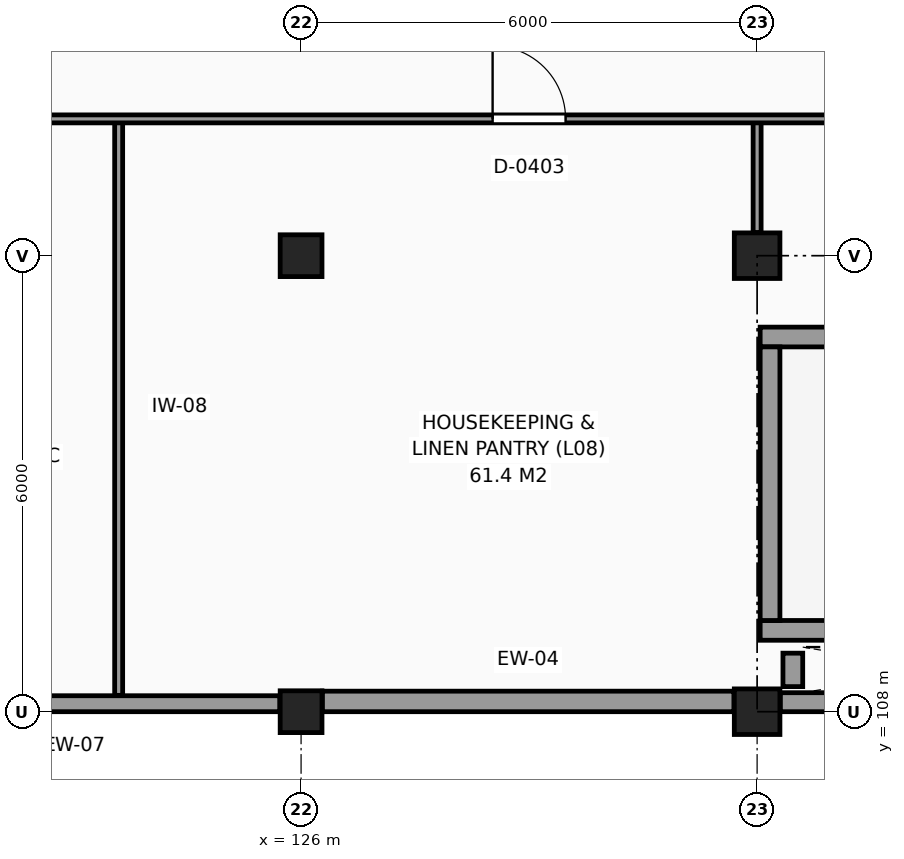
"""IFC4 building model, lengths in metres.
Left out: names, types, materials, properties, quantities, classifications, styles, units other than length and angle.
Written with IfcOpenShell. Run it as: python <this file> out.ifc"""

import sys

from ifc_helpers import new_model, si_unit, direction, frame, frame_2d, origin, origin_2d, place, context, subcontext, project, spatial, rectangle, extrude, element, fill, save


model = new_model("IFC4")
c1 = context("Model", 3, precision=1e-05, world=origin(), true_north=direction((0.0, 1.0)))
c2 = subcontext(c1, "Body", "Model", "MODEL_VIEW")
j1 = project(units=[si_unit("LENGTHUNIT", "METRE"), si_unit("PLANEANGLEUNIT", "RADIAN")], contexts=[c1])
p1 = place(None, origin())
s1 = spatial("IfcSite", under=j1, at=p1, CompositionType="ELEMENT")
p2 = place(p1, origin())
s2 = spatial("IfcBuilding", under=s1, at=p2, CompositionType="ELEMENT")
p3 = place(p2, frame((0.0, 0.0, 34.8)))
s3 = spatial("IfcBuildingStorey", under=s2, at=p3, CompositionType="ELEMENT", Elevation=34.8)
for number, where, z_axis, x_axis in (
    (1, (126.0, 108.0, 0.0), (0.0, 0.0, 1.0), (1.0, 0.0, 0.0)),
    (2, (126.0, 114.0, 0.0), (0.0, 0.0, 1.0), (1.0, 0.0, 0.0)),
):
    element("IfcColumn", number, at=place(p3, frame(where, z_axis=z_axis, x_axis=x_axis)), inside=s3, PredefinedType="COLUMN", context=c2, shape_type="SweptSolid", body=[
        extrude(rectangle(XDim=0.55, YDim=0.55, at=origin_2d()), origin(), (0.0, 0.0, 1.0), 3.3),
    ])
for number, where, z_axis, x_axis in (
    (3, (132.0, 108.0, 0.0), (0.0, 0.0, 1.0), (1.0, 0.0, 0.0)),
    (4, (132.0, 114.0, 0.0), (0.0, 0.0, 1.0), (1.0, 0.0, 0.0)),
):
    element("IfcColumn", number, at=place(p3, frame(where, z_axis=z_axis, x_axis=x_axis)), inside=s3, PredefinedType="COLUMN", context=c2, shape_type="SweptSolid", body=[
        extrude(rectangle(XDim=0.6, YDim=0.6, at=origin_2d()), origin(), (0.0, 0.0, 1.0), 3.3),
    ])
p4 = place(p3, frame((120.305, 108.105, 0.0), z_axis=(0.0, 0.0, 1.0), x_axis=(1.0, 0.0, 0.0)))
e5 = element("IfcWall", 5, at=p4, inside=s3, PredefinedType="SOLIDWALL", context=c2, shape_type="SweptSolid", body=[
    extrude(rectangle(XDim=5.415, YDim=0.21, at=frame_2d((2.708, 0.0))), origin(), (0.0, 0.0, 1.0), 2.42),
])
p5 = place(p3, frame((126.28, 108.135, 0.0), z_axis=(0.0, 0.0, 1.0), x_axis=(1.0, 0.0, 0.0)))
e6 = element("IfcWall", 6, at=p5, inside=s3, PredefinedType="SOLIDWALL", context=c2, shape_type="SweptSolid", body=[
    extrude(rectangle(XDim=5.415, YDim=0.27, at=frame_2d((2.708, 0.0))), origin(), (0.0, 0.0, 1.0), 2.42),
])
p6 = place(p3, frame((132.305, 108.125, 0.0), z_axis=(0.0, 0.0, 1.0), x_axis=(1.0, 0.0, 0.0)))
e7 = element("IfcWall", 7, at=p6, inside=s3, PredefinedType="SOLIDWALL", context=c2, shape_type="SweptSolid", body=[
    extrude(rectangle(XDim=5.415, YDim=0.25, at=frame_2d((2.708, 0.0))), origin(), (0.0, 0.0, 1.0), 3.07),
])
for number, where, z_axis, x_axis in (
    (8, (132.04, 109.07, 0.0), (0.0, 0.0, 1.0), (1.0, 0.0, 0.0)),
    (9, (132.04, 112.93, 0.0), (0.0, 0.0, 1.0), (1.0, 0.0, 0.0)),
):
    element("IfcWall", number, at=place(p3, frame(where, z_axis=z_axis, x_axis=x_axis)), inside=s3, PredefinedType="SHEAR", context=c2, shape_type="SweptSolid", body=[
        extrude(rectangle(XDim=10.72, YDim=0.26, at=frame_2d((5.36, 0.0))), origin(), (0.0, 0.0, 1.0), 3.3),
    ])
p7 = place(p3, frame((132.17, 109.2, 0.0), z_axis=(0.0, 0.0, 1.0), x_axis=(0.0, 1.0, 0.0)))
e10 = element("IfcWall", 10, at=p7, inside=s3, PredefinedType="SHEAR", context=c2, shape_type="SweptSolid", body=[
    extrude(rectangle(XDim=3.6, YDim=0.26, at=frame_2d((1.8, 0.0))), origin(), (0.0, 0.0, 1.0), 3.3),
])
p8 = place(p3, frame((132.47, 108.33, 0.0), z_axis=(0.0, 0.0, 1.0), x_axis=(0.0, 1.0, 0.0)))
e11 = element("IfcWall", 11, at=p8, inside=s3, PredefinedType="SHEAR", context=c2, shape_type="SweptSolid", body=[
    extrude(rectangle(XDim=0.44, YDim=0.26, at=frame_2d((0.22, 0.0))), origin(), (0.0, 0.0, 1.0), 3.3),
])
p9 = place(p3, frame((123.6, 108.215, 0.0), z_axis=(0.0, 0.0, 1.0), x_axis=(0.0, 1.0, 0.0)))
e12 = element("IfcWall", 12, at=p9, inside=s3, PredefinedType="PARTITIONING", context=c2, shape_type="SweptSolid", body=[
    extrude(rectangle(XDim=7.585, YDim=0.105, at=frame_2d((3.792, 0.0))), origin(), (0.0, 0.0, 1.0), 3.07),
])
p10 = place(p3, frame((132.0, 114.305, 0.0), z_axis=(0.0, 0.0, 1.0), x_axis=(0.0, 1.0, 0.0)))
e13 = element("IfcWall", 13, at=p10, inside=s3, PredefinedType="PARTITIONING", context=c2, shape_type="SweptSolid", body=[
    extrude(rectangle(XDim=1.495, YDim=0.105, at=frame_2d((0.748, 0.0))), origin(), (0.0, 0.0, 1.0), 2.27),
])
p11 = place(p3, frame((66.275, 115.8, 0.0), z_axis=(0.0, 0.0, 1.0), x_axis=(1.0, 0.0, 0.0)))
e14 = element("IfcWall", 14, at=p11, inside=s3, PredefinedType="PARTITIONING", context=c2, shape_type="SweptSolid", body=[
    extrude(rectangle(XDim=103.525, YDim=0.105, at=frame_2d((51.763, 0.0))), origin(), (0.0, 0.0, 1.0), 3.07),
])
p12 = place(p11, frame((80.125, 0.0, 0.0)))
e15 = element("IfcOpeningElement", 15, at=p12, cuts=e14, PredefinedType="OPENING", context=c2, shape_type="SweptSolid", body=[
    extrude(rectangle(XDim=1.2, YDim=2.2, at=frame_2d((0.6, 1.1))), frame((0.0, 0.062, 0.0), z_axis=(0.0, -1.0, 0.0), x_axis=(1.0, 0.0, 0.0)), (0.0, 0.0, 1.0), 0.125),
])
p13 = place(p11, frame((50.125, 0.0, 0.0)))
e16 = element("IfcOpeningElement", 16, at=p13, cuts=e14, PredefinedType="OPENING", context=c2, shape_type="SweptSolid", body=[
    extrude(rectangle(XDim=1.2, YDim=2.2, at=frame_2d((0.6, 1.1))), frame((0.0, 0.062, 0.0), z_axis=(0.0, -1.0, 0.0), x_axis=(1.0, 0.0, 0.0)), (0.0, 0.0, 1.0), 0.125),
])
p14 = place(p11, frame((8.975, 0.0, 0.0)))
e17 = element("IfcOpeningElement", 17, at=p14, cuts=e14, PredefinedType="OPENING", context=c2, shape_type="SweptSolid", body=[
    extrude(rectangle(XDim=1.1, YDim=2.15, at=frame_2d((0.55, 1.075))), frame((0.0, 0.062, 0.0), z_axis=(0.0, -1.0, 0.0), x_axis=(1.0, 0.0, 0.0)), (0.0, 0.0, 1.0), 0.125),
])
p15 = place(p11, frame((55.275, 0.0, 0.0)))
e18 = element("IfcOpeningElement", 18, at=p15, cuts=e14, PredefinedType="OPENING", context=c2, shape_type="SweptSolid", body=[
    extrude(rectangle(XDim=1.0, YDim=2.15, at=frame_2d((0.5, 1.075))), frame((0.0, 0.062, 0.0), z_axis=(0.0, -1.0, 0.0), x_axis=(1.0, 0.0, 0.0)), (0.0, 0.0, 1.0), 0.125),
])
p16 = place(p11, frame((62.245, 0.0, 0.0)))
e19 = element("IfcOpeningElement", 19, at=p16, cuts=e14, PredefinedType="OPENING", context=c2, shape_type="SweptSolid", body=[
    extrude(rectangle(XDim=0.96, YDim=2.15, at=frame_2d((0.48, 1.075))), frame((0.0, 0.062, 0.0), z_axis=(0.0, -1.0, 0.0), x_axis=(1.0, 0.0, 0.0)), (0.0, 0.0, 1.0), 0.125),
])
p17 = place(p11, frame((31.925, 0.0, 0.0)))
e20 = element("IfcOpeningElement", 20, at=p17, cuts=e14, PredefinedType="OPENING", context=c2, shape_type="SweptSolid", body=[
    extrude(rectangle(XDim=1.6, YDim=2.25, at=frame_2d((0.8, 1.125))), frame((0.0, 0.062, 0.0), z_axis=(0.0, -1.0, 0.0), x_axis=(1.0, 0.0, 0.0)), (0.0, 0.0, 1.0), 0.125),
])
p18 = place(p11, frame((18.55, 0.0, 0.0)))
e21 = element("IfcOpeningElement", 21, at=p18, cuts=e14, PredefinedType="OPENING", context=c2, shape_type="SweptSolid", body=[
    extrude(rectangle(XDim=0.95, YDim=2.1, at=frame_2d((0.475, 1.05))), frame((0.0, 0.062, 0.0), z_axis=(0.0, -1.0, 0.0), x_axis=(1.0, 0.0, 0.0)), (0.0, 0.0, 1.0), 0.125),
])
p19 = place(p11, frame((84.45, 0.0, 0.0)))
e22 = element("IfcOpeningElement", 22, at=p19, cuts=e14, PredefinedType="OPENING", context=c2, shape_type="SweptSolid", body=[
    extrude(rectangle(XDim=0.95, YDim=2.1, at=frame_2d((0.475, 1.05))), frame((0.0, 0.062, 0.0), z_axis=(0.0, -1.0, 0.0), x_axis=(1.0, 0.0, 0.0)), (0.0, 0.0, 1.0), 0.125),
])
p20 = place(p16, origin())
e23 = element("IfcDoor", 23, at=p20, inside=s3, OperationType="SINGLE_SWING_LEFT", PredefinedType="DOOR", context=c2, shape_type="SweptSolid", body=[
    extrude(rectangle(XDim=0.96, YDim=2.15, at=frame_2d((0.48, 1.075))), frame((0.0, 0.025, 0.0), z_axis=(0.0, -1.0, 0.0), x_axis=(1.0, 0.0, 0.0)), (0.0, 0.0, 1.0), 0.05),
])
fill(e19, e23)
save(model, sys.argv[1])
